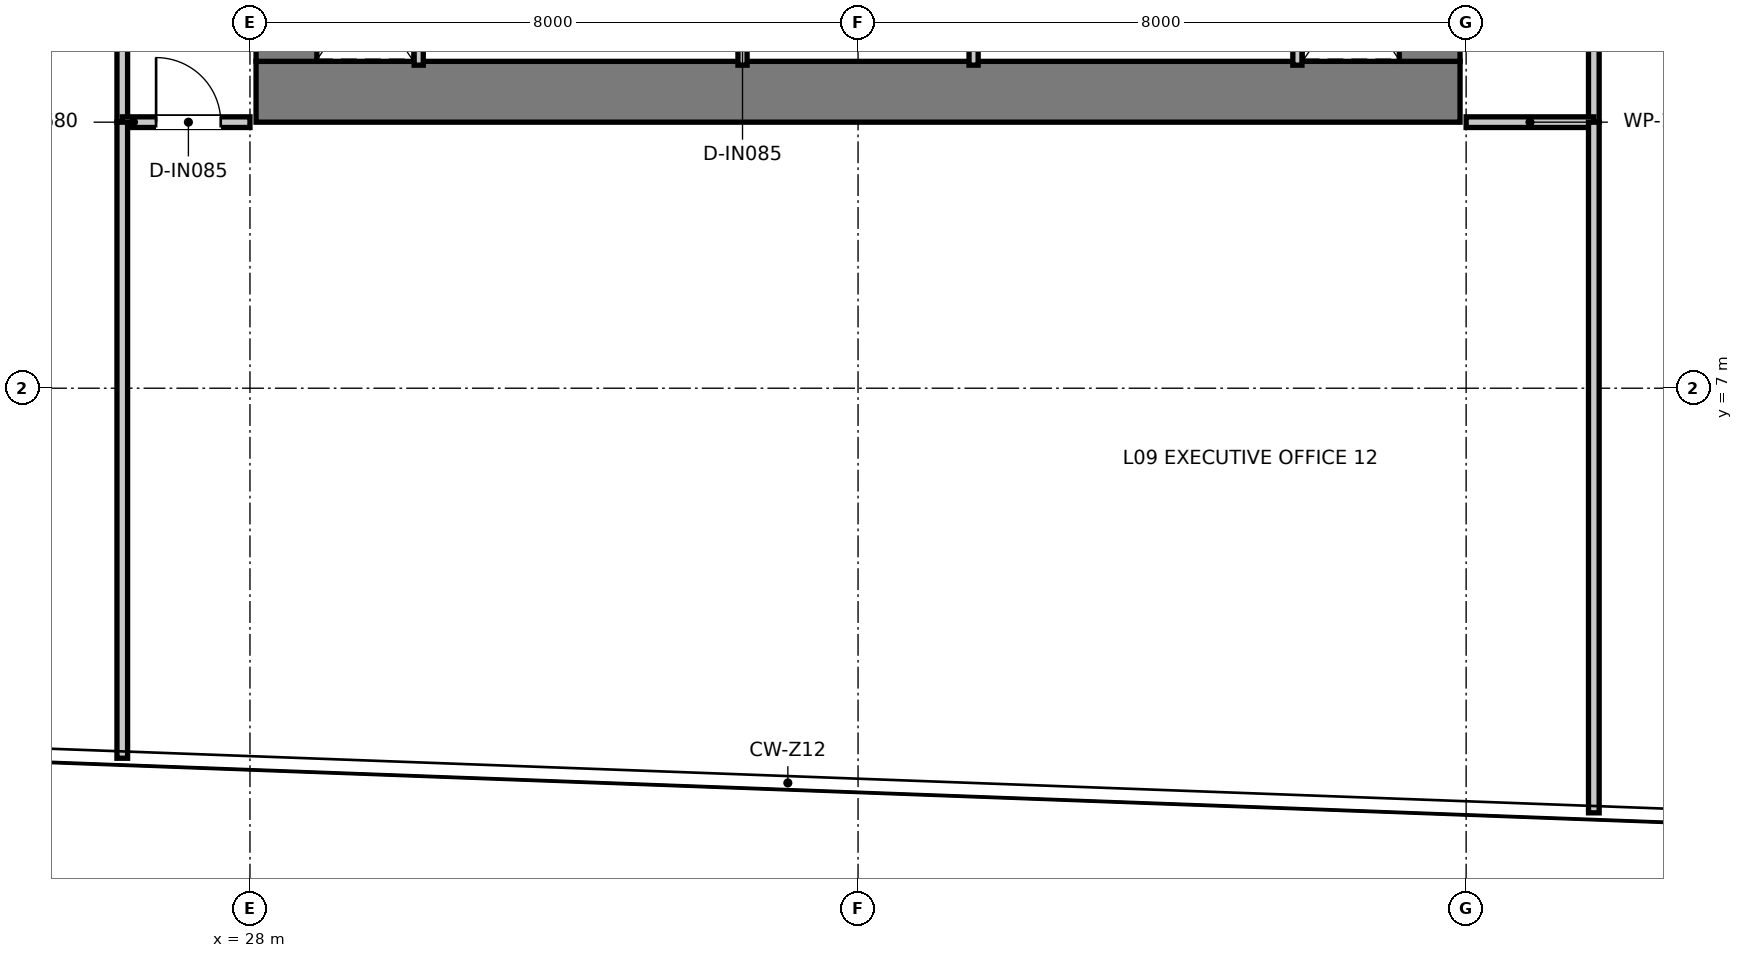
"""IFC4 building model, lengths in metres.
Left out: names, types, materials, properties, quantities, classifications, styles, units other than length and angle.
Written with IfcOpenShell. Run it as: python <this file> out.ifc"""

import sys

from ifc_helpers import new_model, si_unit, direction, frame, frame_2d, origin, place, context, subcontext, project, spatial, rectangle, extrude, element, fill, save


model = new_model("IFC4")
c1 = context("Model", 3, precision=1e-05, world=origin(), true_north=direction((0.0, 1.0)))
c2 = subcontext(c1, "Body", "Model", "MODEL_VIEW")
j1 = project(units=[si_unit("LENGTHUNIT", "METRE"), si_unit("PLANEANGLEUNIT", "RADIAN")], contexts=[c1])
p1 = place(None, origin())
s1 = spatial("IfcSite", under=j1, at=p1, CompositionType="ELEMENT")
p2 = place(p1, origin())
s2 = spatial("IfcBuilding", under=s1, at=p2, CompositionType="ELEMENT")
p3 = place(p2, frame((0.0, 0.0, 40.8)))
s3 = spatial("IfcBuildingStorey", under=s2, at=p3, CompositionType="ELEMENT", Elevation=40.8)
p4 = place(p3, frame((28.08, 10.9, 0.0), z_axis=(0.0, 0.0, 1.0), x_axis=(1.0, 0.0, 0.0)))
e1 = element("IfcWall", 1, at=p4, inside=s3, PredefinedType="SHEAR", context=c2, shape_type="SweptSolid", body=[
    extrude(rectangle(XDim=15.84, YDim=0.8, at=frame_2d((7.92, 0.0))), origin(), (0.0, 0.0, 1.0), 3.95),
])
for number, where, z_axis, x_axis in (
    (2, (28.48, 11.3, 0.0), (0.0, 0.0, 1.0), (0.0, 1.0, 0.0)),
    (3, (43.52, 11.3, 0.0), (0.0, 0.0, 1.0), (0.0, 1.0, 0.0)),
):
    element("IfcWall", number, at=place(p3, frame(where, z_axis=z_axis, x_axis=x_axis)), inside=s3, PredefinedType="SHEAR", context=c2, shape_type="SweptSolid", body=[
        extrude(rectangle(XDim=14.7, YDim=0.8, at=frame_2d((7.35, 0.0))), origin(), (0.0, 0.0, 1.0), 3.95),
    ])
for number, where, z_axis, x_axis in (
    (4, (30.22, 11.25, 0.0), (0.0, 0.0, 1.0), (0.0, 1.0, 0.0)),
    (5, (41.78, 11.25, 0.0), (0.0, 0.0, 1.0), (0.0, 1.0, 0.0)),
):
    element("IfcWall", number, at=place(p3, frame(where, z_axis=z_axis, x_axis=x_axis)), inside=s3, PredefinedType="PARTITIONING", context=c2, shape_type="SweptSolid", body=[
        extrude(rectangle(XDim=1.97, YDim=0.12, at=frame_2d((0.985, 0.0))), origin(), (0.0, 0.0, 1.0), 3.67),
    ])
p5 = place(p3, frame((34.48, 11.25, 0.0), z_axis=(0.0, 0.0, 1.0), x_axis=(0.0, 1.0, 0.0)))
e6 = element("IfcWall", 6, at=p5, inside=s3, PredefinedType="PARTITIONING", context=c2, shape_type="SweptSolid", body=[
    extrude(rectangle(XDim=1.97, YDim=0.12, at=frame_2d((0.985, 0.0))), origin(), (0.0, 0.0, 1.0), 3.67),
])
p6 = place(p5, frame((0.545, 0.0, 0.0)))
e7 = element("IfcOpeningElement", 7, at=p6, cuts=e6, PredefinedType="OPENING", context=c2, shape_type="SweptSolid", body=[
    extrude(rectangle(XDim=0.85, YDim=2.1, at=frame_2d((0.425, 1.05))), frame((0.0, 0.07, 0.0), z_axis=(0.0, -1.0, 0.0), x_axis=(1.0, 0.0, 0.0)), (0.0, 0.0, 1.0), 0.14),
])
p7 = place(p3, frame((37.52, 11.25, 0.0), z_axis=(0.0, 0.0, 1.0), x_axis=(0.0, 1.0, 0.0)))
e8 = element("IfcWall", 8, at=p7, inside=s3, PredefinedType="PARTITIONING", context=c2, shape_type="SweptSolid", body=[
    extrude(rectangle(XDim=1.97, YDim=0.12, at=frame_2d((0.985, 0.0))), origin(), (0.0, 0.0, 1.0), 3.67),
])
p8 = place(p7, frame((0.545, 0.0, 0.0)))
e9 = element("IfcOpeningElement", 9, at=p8, cuts=e8, PredefinedType="OPENING", context=c2, shape_type="SweptSolid", body=[
    extrude(rectangle(XDim=0.85, YDim=2.1, at=frame_2d((0.425, 1.05))), frame((0.0, 0.07, 0.0), z_axis=(0.0, -1.0, 0.0), x_axis=(1.0, 0.0, 0.0)), (0.0, 0.0, 1.0), 0.14),
])
p9 = place(p3, frame((26.32, 10.5, 0.0), z_axis=(0.0, 0.0, 1.0), x_axis=(0.0, 1.0, 0.0)))
e10 = element("IfcWall", 10, at=p9, inside=s3, PredefinedType="PARTITIONING", context=c2, shape_type="SweptSolid", body=[
    extrude(rectangle(XDim=25.62, YDim=0.14, at=frame_2d((12.81, 0.0))), origin(), (0.0, 0.0, 1.0), 2.97),
])
p10 = place(p9, frame((10.525, 0.0, 0.0)))
e11 = element("IfcOpeningElement", 11, at=p10, cuts=e10, PredefinedType="OPENING", context=c2, shape_type="SweptSolid", body=[
    extrude(rectangle(XDim=0.95, YDim=2.1, at=frame_2d((0.475, 1.05))), frame((0.0, 0.08, 0.0), z_axis=(0.0, -1.0, 0.0), x_axis=(1.0, 0.0, 0.0)), (0.0, 0.0, 1.0), 0.16),
])
p11 = place(p9, frame((19.125, 0.0, 0.0)))
e12 = element("IfcOpeningElement", 12, at=p11, cuts=e10, PredefinedType="OPENING", context=c2, shape_type="SweptSolid", body=[
    extrude(rectangle(XDim=0.95, YDim=2.1, at=frame_2d((0.475, 1.05))), frame((0.0, 0.08, 0.0), z_axis=(0.0, -1.0, 0.0), x_axis=(1.0, 0.0, 0.0)), (0.0, 0.0, 1.0), 0.16),
])
p12 = place(p3, frame((45.68, 10.5, 0.0), z_axis=(0.0, 0.0, 1.0), x_axis=(0.0, 1.0, 0.0)))
e13 = element("IfcWall", 13, at=p12, inside=s3, PredefinedType="PARTITIONING", context=c2, shape_type="SweptSolid", body=[
    extrude(rectangle(XDim=25.62, YDim=0.14, at=frame_2d((12.81, 0.0))), origin(), (0.0, 0.0, 1.0), 2.97),
])
p13 = place(p12, frame((7.675, 0.0, 0.0)))
e14 = element("IfcOpeningElement", 14, at=p13, cuts=e13, PredefinedType="OPENING", context=c2, shape_type="SweptSolid", body=[
    extrude(rectangle(XDim=0.95, YDim=2.1, at=frame_2d((0.475, 1.05))), frame((0.0, 0.08, 0.0), z_axis=(0.0, -1.0, 0.0), x_axis=(1.0, 0.0, 0.0)), (0.0, 0.0, 1.0), 0.16),
])
p14 = place(p12, frame((11.325, 0.0, 0.0)))
e15 = element("IfcOpeningElement", 15, at=p14, cuts=e13, PredefinedType="OPENING", context=c2, shape_type="SweptSolid", body=[
    extrude(rectangle(XDim=0.95, YDim=2.1, at=frame_2d((0.475, 1.05))), frame((0.0, 0.08, 0.0), z_axis=(0.0, -1.0, 0.0), x_axis=(1.0, 0.0, 0.0)), (0.0, 0.0, 1.0), 0.16),
])
p15 = place(p12, frame((16.325, 0.0, 0.0)))
e16 = element("IfcOpeningElement", 16, at=p15, cuts=e13, PredefinedType="OPENING", context=c2, shape_type="SweptSolid", body=[
    extrude(rectangle(XDim=0.95, YDim=2.1, at=frame_2d((0.475, 1.05))), frame((0.0, 0.08, 0.0), z_axis=(0.0, -1.0, 0.0), x_axis=(1.0, 0.0, 0.0)), (0.0, 0.0, 1.0), 0.16),
])
p16 = place(p12, frame((20.625, 0.0, 0.0)))
e17 = element("IfcOpeningElement", 17, at=p16, cuts=e13, PredefinedType="OPENING", context=c2, shape_type="SweptSolid", body=[
    extrude(rectangle(XDim=0.95, YDim=2.1, at=frame_2d((0.475, 1.05))), frame((0.0, 0.08, 0.0), z_axis=(0.0, -1.0, 0.0), x_axis=(1.0, 0.0, 0.0)), (0.0, 0.0, 1.0), 0.16),
])
p17 = place(p12, frame((23.075, 0.0, 0.0)))
e18 = element("IfcOpeningElement", 18, at=p17, cuts=e13, PredefinedType="OPENING", context=c2, shape_type="SweptSolid", body=[
    extrude(rectangle(XDim=0.95, YDim=2.1, at=frame_2d((0.475, 1.05))), frame((0.0, 0.08, 0.0), z_axis=(0.0, -1.0, 0.0), x_axis=(1.0, 0.0, 0.0)), (0.0, 0.0, 1.0), 0.16),
])
p18 = place(p3, frame((26.32, 10.5, 0.0), z_axis=(0.0, 0.0, 1.0), x_axis=(1.0, 0.0, 0.0)))
e19 = element("IfcWall", 19, at=p18, inside=s3, PredefinedType="PARTITIONING", context=c2, shape_type="SweptSolid", body=[
    extrude(rectangle(XDim=1.68, YDim=0.14, at=frame_2d((0.84, 0.0))), origin(), (0.0, 0.0, 1.0), 3.67),
])
p19 = place(p18, frame((0.445, 0.0, 0.0)))
e20 = element("IfcOpeningElement", 20, at=p19, cuts=e19, PredefinedType="OPENING", context=c2, shape_type="SweptSolid", body=[
    extrude(rectangle(XDim=0.85, YDim=2.1, at=frame_2d((0.425, 1.05))), frame((0.0, 0.08, 0.0), z_axis=(0.0, -1.0, 0.0), x_axis=(1.0, 0.0, 0.0)), (0.0, 0.0, 1.0), 0.16),
])
p20 = place(p3, frame((44.0, 10.5, 0.0), z_axis=(0.0, 0.0, 1.0), x_axis=(1.0, 0.0, 0.0)))
e21 = element("IfcWall", 21, at=p20, inside=s3, PredefinedType="PARTITIONING", context=c2, shape_type="SweptSolid", body=[
    extrude(rectangle(XDim=1.68, YDim=0.14, at=frame_2d((0.84, 0.0))), origin(), (0.0, 0.0, 1.0), 3.67),
])
p21 = place(p3, frame((26.32, 2.132, 0.0), z_axis=(0.0, 0.0, 1.0), x_axis=(0.0, 1.0, 0.0)))
e22 = element("IfcWall", 22, at=p21, inside=s3, PredefinedType="PARTITIONING", context=c2, shape_type="SweptSolid", body=[
    extrude(rectangle(XDim=8.368, YDim=0.14, at=frame_2d((4.184, 0.0))), origin(), (0.0, 0.0, 1.0), 3.67),
])
p22 = place(p3, frame((45.68, 1.414, 0.0), z_axis=(0.0, 0.0, 1.0), x_axis=(0.0, 1.0, 0.0)))
e23 = element("IfcWall", 23, at=p22, inside=s3, PredefinedType="PARTITIONING", context=c2, shape_type="SweptSolid", body=[
    extrude(rectangle(XDim=9.086, YDim=0.14, at=frame_2d((4.543, 0.0))), origin(), (0.0, 0.0, 1.0), 3.67),
])
p23 = place(p19, origin())
e24 = element("IfcDoor", 24, at=p23, inside=s3, OperationType="SINGLE_SWING_LEFT", PredefinedType="DOOR", context=c2, shape_type="SweptSolid", body=[
    extrude(rectangle(XDim=0.85, YDim=2.1, at=frame_2d((0.425, 1.05))), frame((0.0, 0.025, 0.0), z_axis=(0.0, -1.0, 0.0), x_axis=(1.0, 0.0, 0.0)), (0.0, 0.0, 1.0), 0.05),
])
fill(e20, e24)
save(model, sys.argv[1])
